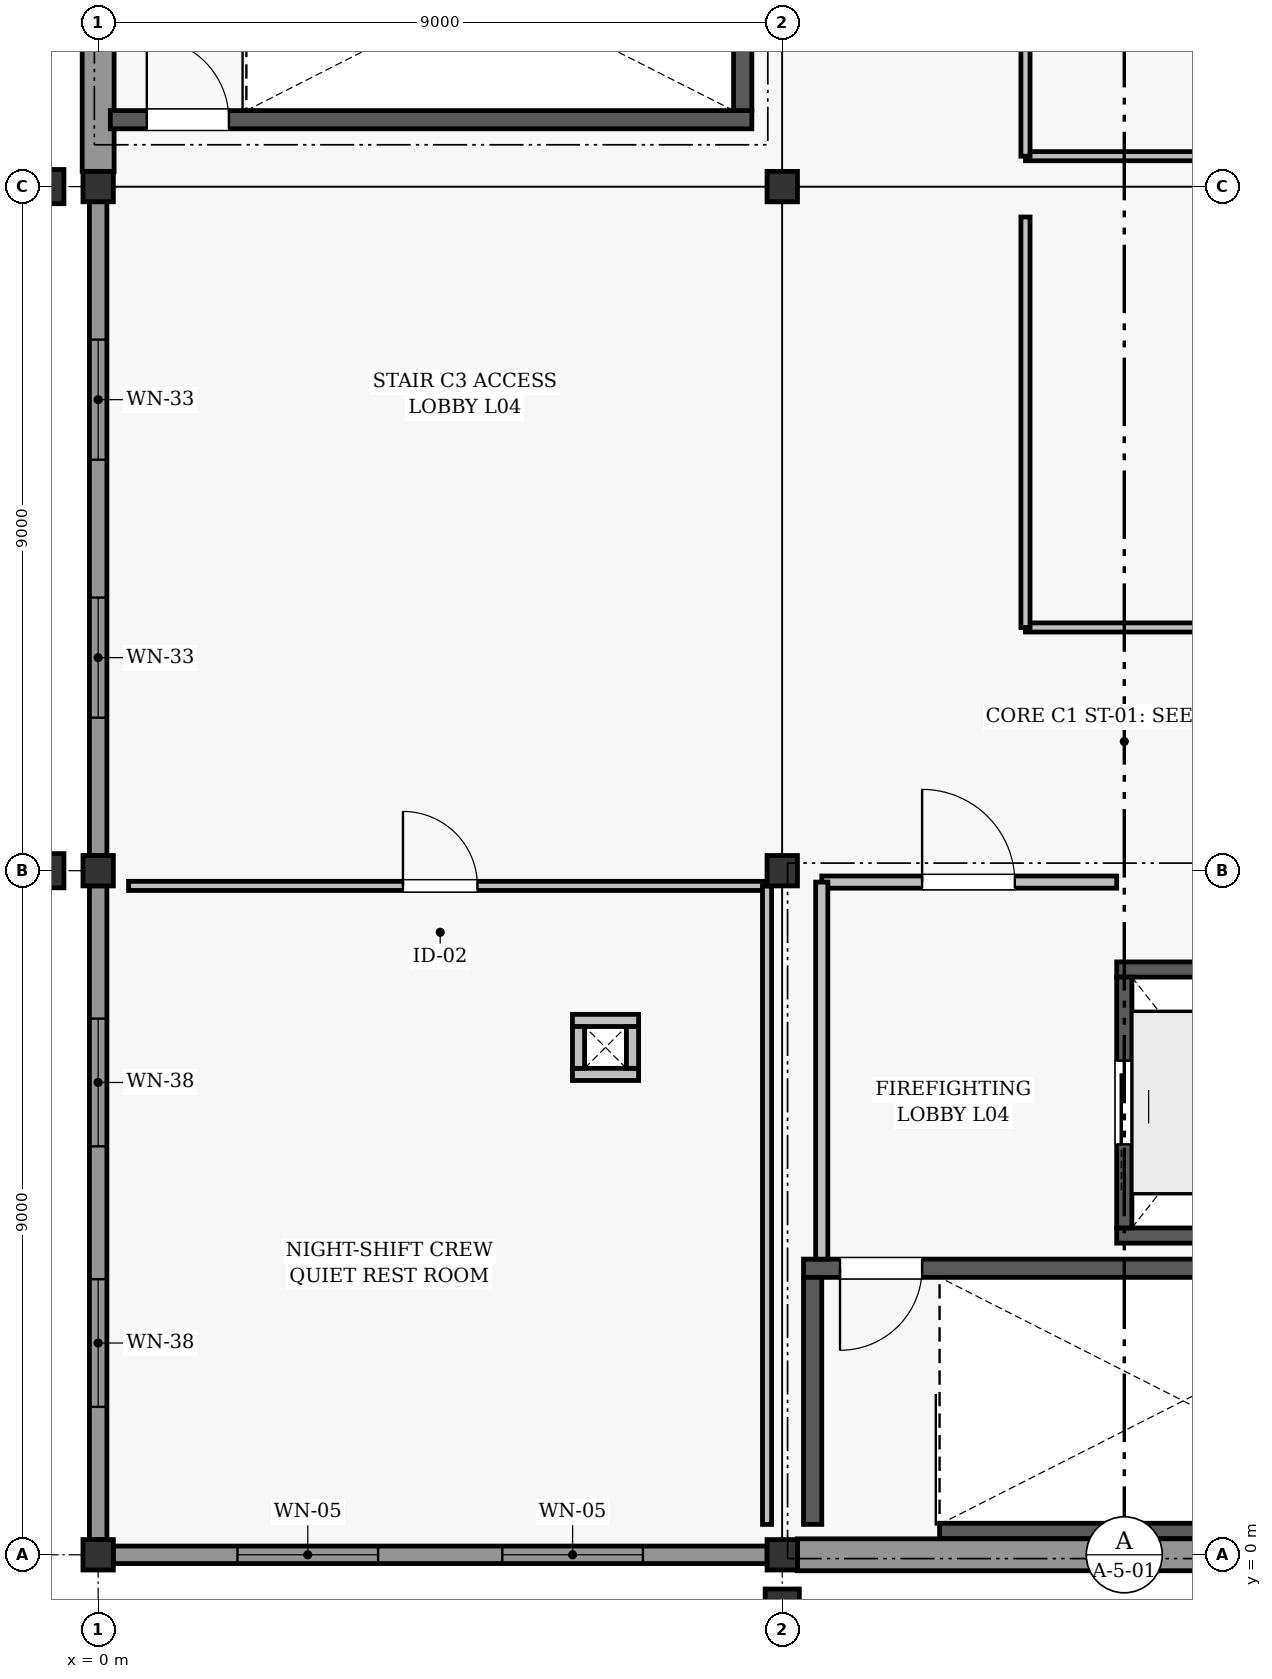
"""IFC4 building model, lengths in metres.
Left out: names, types, materials, properties, quantities, classifications, styles, units other than length and angle.
Written with IfcOpenShell. Run it as: python <this file> out.ifc"""

import sys

from ifc_helpers import new_model, si_unit, direction, frame, frame_2d, origin, origin_2d, place, context, subcontext, project, spatial, rectangle, extrude, element, fill, save


model = new_model("IFC4")
c1 = context("Model", 3, precision=1e-05, world=origin(), true_north=direction((0.0, 1.0)))
c2 = subcontext(c1, "Body", "Model", "MODEL_VIEW")
j1 = project(units=[si_unit("LENGTHUNIT", "METRE"), si_unit("PLANEANGLEUNIT", "RADIAN")], contexts=[c1])
p1 = place(None, origin())
s1 = spatial("IfcSite", under=j1, at=p1, CompositionType="ELEMENT")
p2 = place(p1, origin())
s2 = spatial("IfcBuilding", under=s1, at=p2, CompositionType="ELEMENT")
p3 = place(p2, frame((0.0, 0.0, 15.0)))
s3 = spatial("IfcBuildingStorey", under=s2, at=p3, CompositionType="ELEMENT", Elevation=15.0)
for number, where, z_axis, x_axis in (
    (1, (0.0, 0.0, 0.0), (0.0, 0.0, 1.0), (1.0, 0.0, 0.0)),
    (2, (0.0, 9.0, 0.0), (0.0, 0.0, 1.0), (1.0, 0.0, 0.0)),
    (3, (0.0, 18.0, 0.0), (0.0, 0.0, 1.0), (1.0, 0.0, 0.0)),
    (4, (9.0, 0.0, 0.0), (0.0, 0.0, 1.0), (1.0, 0.0, 0.0)),
    (5, (9.0, 9.0, 0.0), (0.0, 0.0, 1.0), (1.0, 0.0, 0.0)),
    (6, (9.0, 18.0, 0.0), (0.0, 0.0, 1.0), (1.0, 0.0, 0.0)),
):
    element("IfcColumn", number, at=place(p3, frame(where, z_axis=z_axis, x_axis=x_axis)), inside=s3, PredefinedType="COLUMN", context=c2, shape_type="SweptSolid", body=[
        extrude(rectangle(XDim=0.4, YDim=0.4, at=origin_2d()), origin(), (0.0, 0.0, 1.0), 3.0),
    ])
for number, where, z_axis, x_axis in (
    (7, (9.0, -0.75, 0.0), (0.0, 0.0, 1.0), (1.0, 0.0, 0.0)),
    (8, (-0.75, 9.0, 0.0), (0.0, 0.0, 1.0), (0.0, 1.0, 0.0)),
    (9, (-0.75, 18.0, 0.0), (0.0, 0.0, 1.0), (0.0, 1.0, 0.0)),
):
    element("IfcColumn", number, at=place(p3, frame(where, z_axis=z_axis, x_axis=x_axis)), inside=s3, PredefinedType="PILASTER", context=c2, shape_type="SweptSolid", body=[
        extrude(rectangle(XDim=0.45, YDim=0.6, at=origin_2d()), origin(), (0.0, 0.0, 1.0), 3.95),
    ])
p4 = place(p3, frame((0.198, 0.0, 0.0), z_axis=(0.0, 0.0, 1.0), x_axis=(1.0, 0.0, 0.0)))
e10 = element("IfcWall", 10, at=p4, inside=s3, PredefinedType="SOLIDWALL", context=c2, shape_type="SweptSolid", body=[
    extrude(rectangle(XDim=8.604, YDim=0.23, at=frame_2d((4.302, 0.0))), origin(), (0.0, 0.0, 1.0), 2.242),
])
p5 = place(p4, frame((1.635, 0.0, 1.02)))
e11 = element("IfcOpeningElement", 11, at=p5, cuts=e10, PredefinedType="OPENING", context=c2, shape_type="SweptSolid", body=[
    extrude(rectangle(XDim=1.85, YDim=1.04, at=frame_2d((0.925, 0.52))), frame((0.0, 0.125, 0.0), z_axis=(0.0, -1.0, 0.0), x_axis=(1.0, 0.0, 0.0)), (0.0, 0.0, 1.0), 0.25),
])
p6 = place(p4, frame((5.119, 0.0, 1.02)))
e12 = element("IfcOpeningElement", 12, at=p6, cuts=e10, PredefinedType="OPENING", context=c2, shape_type="SweptSolid", body=[
    extrude(rectangle(XDim=1.85, YDim=1.04, at=frame_2d((0.925, 0.52))), frame((0.0, 0.125, 0.0), z_axis=(0.0, -1.0, 0.0), x_axis=(1.0, 0.0, 0.0)), (0.0, 0.0, 1.0), 0.25),
])
p7 = place(p3, frame((9.198, 0.0, 0.0), z_axis=(0.0, 0.0, 1.0), x_axis=(1.0, 0.0, 0.0)))
e13 = element("IfcWall", 13, at=p7, inside=s3, PredefinedType="SOLIDWALL", context=c2, shape_type="SweptSolid", body=[
    extrude(rectangle(XDim=8.604, YDim=0.42, at=frame_2d((4.302, 0.0))), origin(), (0.0, 0.0, 1.0), 2.242),
])
p8 = place(p3, frame((0.0, 0.198, 0.0), z_axis=(0.0, 0.0, 1.0), x_axis=(0.0, 1.0, 0.0)))
e14 = element("IfcWall", 14, at=p8, inside=s3, PredefinedType="SOLIDWALL", context=c2, shape_type="SweptSolid", body=[
    extrude(rectangle(XDim=8.604, YDim=0.23, at=frame_2d((4.302, 0.0))), origin(), (0.0, 0.0, 1.0), 2.242),
])
p9 = place(p8, frame((1.748, 0.0, 0.45)))
e15 = element("IfcOpeningElement", 15, at=p9, cuts=e14, PredefinedType="OPENING", context=c2, shape_type="SweptSolid", body=[
    extrude(rectangle(XDim=1.68, YDim=1.66, at=frame_2d((0.84, 0.83))), frame((0.0, 0.125, 0.0), z_axis=(0.0, -1.0, 0.0), x_axis=(1.0, 0.0, 0.0)), (0.0, 0.0, 1.0), 0.25),
])
p10 = place(p8, frame((5.176, 0.0, 0.45)))
e16 = element("IfcOpeningElement", 16, at=p10, cuts=e14, PredefinedType="OPENING", context=c2, shape_type="SweptSolid", body=[
    extrude(rectangle(XDim=1.68, YDim=1.66, at=frame_2d((0.84, 0.83))), frame((0.0, 0.125, 0.0), z_axis=(0.0, -1.0, 0.0), x_axis=(1.0, 0.0, 0.0)), (0.0, 0.0, 1.0), 0.25),
])
p11 = place(p3, frame((0.0, 9.198, 0.0), z_axis=(0.0, 0.0, 1.0), x_axis=(0.0, 1.0, 0.0)))
e17 = element("IfcWall", 17, at=p11, inside=s3, PredefinedType="SOLIDWALL", context=c2, shape_type="SweptSolid", body=[
    extrude(rectangle(XDim=8.604, YDim=0.23, at=frame_2d((4.302, 0.0))), origin(), (0.0, 0.0, 1.0), 2.242),
])
p12 = place(p11, frame((1.815, 0.0, 0.46)))
e18 = element("IfcOpeningElement", 18, at=p12, cuts=e17, PredefinedType="OPENING", context=c2, shape_type="SweptSolid", body=[
    extrude(rectangle(XDim=1.58, YDim=1.6, at=frame_2d((0.79, 0.8))), frame((0.0, 0.125, 0.0), z_axis=(0.0, -1.0, 0.0), x_axis=(1.0, 0.0, 0.0)), (0.0, 0.0, 1.0), 0.25),
])
p13 = place(p11, frame((5.209, 0.0, 0.46)))
e19 = element("IfcOpeningElement", 19, at=p13, cuts=e17, PredefinedType="OPENING", context=c2, shape_type="SweptSolid", body=[
    extrude(rectangle(XDim=1.58, YDim=1.6, at=frame_2d((0.79, 0.8))), frame((0.0, 0.125, 0.0), z_axis=(0.0, -1.0, 0.0), x_axis=(1.0, 0.0, 0.0)), (0.0, 0.0, 1.0), 0.25),
])
p14 = place(p3, frame((0.0, 18.198, 0.0), z_axis=(0.0, 0.0, 1.0), x_axis=(0.0, 1.0, 0.0)))
e20 = element("IfcWall", 20, at=p14, inside=s3, PredefinedType="SOLIDWALL", context=c2, shape_type="SweptSolid", body=[
    extrude(rectangle(XDim=8.604, YDim=0.42, at=frame_2d((4.302, 0.0))), origin(), (0.0, 0.0, 1.0), 2.242),
])
p15 = place(p3, frame((11.07, 0.315, 0.0), z_axis=(0.0, 0.0, 1.0), x_axis=(1.0, 0.0, 0.0)))
e21 = element("IfcWall", 21, at=p15, inside=s3, PredefinedType="SHEAR", context=c2, shape_type="SweptSolid", body=[
    extrude(rectangle(XDim=6.41, YDim=0.2, at=frame_2d((3.205, 0.0))), origin(), (0.0, 0.0, 1.0), 2.79),
])
p16 = place(p3, frame((9.28, 3.77, 0.0), z_axis=(0.0, 0.0, 1.0), x_axis=(1.0, 0.0, 0.0)))
e22 = element("IfcWall", 22, at=p16, inside=s3, PredefinedType="SHEAR", context=c2, shape_type="SweptSolid", body=[
    extrude(rectangle(XDim=8.44, YDim=0.24, at=frame_2d((4.22, 0.0))), origin(), (0.0, 0.0, 1.0), 2.79),
])
p17 = place(p16, frame((0.48, 0.0, 0.0)))
e23 = element("IfcOpeningElement", 23, at=p17, cuts=e22, PredefinedType="OPENING", context=c2, shape_type="SweptSolid", body=[
    extrude(rectangle(XDim=1.08, YDim=2.08, at=frame_2d((0.54, 1.04))), frame((0.0, 0.13, 0.0), z_axis=(0.0, -1.0, 0.0), x_axis=(1.0, 0.0, 0.0)), (0.0, 0.0, 1.0), 0.26),
])
p18 = place(p3, frame((9.4, 0.4, 0.0), z_axis=(0.0, 0.0, 1.0), x_axis=(0.0, 1.0, 0.0)))
e24 = element("IfcWall", 24, at=p18, inside=s3, PredefinedType="SHEAR", context=c2, shape_type="SweptSolid", body=[
    extrude(rectangle(XDim=3.25, YDim=0.24, at=frame_2d((1.625, 0.0))), origin(), (0.0, 0.0, 1.0), 2.79),
])
p19 = place(p3, frame((0.16, 18.88, 0.0), z_axis=(0.0, 0.0, 1.0), x_axis=(1.0, 0.0, 0.0)))
e25 = element("IfcWall", 25, at=p19, inside=s3, PredefinedType="SHEAR", context=c2, shape_type="SweptSolid", body=[
    extrude(rectangle(XDim=8.44, YDim=0.24, at=frame_2d((4.22, 0.0))), origin(), (0.0, 0.0, 1.0), 2.79),
])
p20 = place(p19, frame((0.48, 0.0, 0.0)))
e26 = element("IfcOpeningElement", 26, at=p20, cuts=e25, PredefinedType="OPENING", context=c2, shape_type="SweptSolid", body=[
    extrude(rectangle(XDim=1.08, YDim=2.08, at=frame_2d((0.54, 1.04))), frame((0.0, 0.13, 0.0), z_axis=(0.0, -1.0, 0.0), x_axis=(1.0, 0.0, 0.0)), (0.0, 0.0, 1.0), 0.26),
])
p21 = place(p3, frame((8.48, 19.0, 0.0), z_axis=(0.0, 0.0, 1.0), x_axis=(0.0, 1.0, 0.0)))
e27 = element("IfcWall", 27, at=p21, inside=s3, PredefinedType="SHEAR", context=c2, shape_type="SweptSolid", body=[
    extrude(rectangle(XDim=3.25, YDim=0.24, at=frame_2d((1.625, 0.0))), origin(), (0.0, 0.0, 1.0), 2.79),
])
for number, where, z_axis, x_axis in (
    (28, (13.4, 4.2, 0.0), (0.0, 0.0, 1.0), (1.0, 0.0, 0.0)),
    (29, (13.4, 7.7, 0.0), (0.0, 0.0, 1.0), (1.0, 0.0, 0.0)),
):
    element("IfcWall", number, at=place(p3, frame(where, z_axis=z_axis, x_axis=x_axis)), inside=s3, PredefinedType="SHEAR", context=c2, shape_type="SweptSolid", body=[
        extrude(rectangle(XDim=3.0, YDim=0.2, at=frame_2d((1.5, 0.0))), origin(), (0.0, 0.0, 1.0), 2.79),
    ])
p22 = place(p3, frame((13.5, 4.3, 0.0), z_axis=(0.0, 0.0, 1.0), x_axis=(0.0, 1.0, 0.0)))
e30 = element("IfcWall", 30, at=p22, inside=s3, PredefinedType="SHEAR", context=c2, shape_type="SweptSolid", body=[
    extrude(rectangle(XDim=3.3, YDim=0.2, at=frame_2d((1.65, 0.0))), origin(), (0.0, 0.0, 1.0), 2.79),
])
p23 = place(p22, frame((1.1, 0.0, 0.0)))
e31 = element("IfcOpeningElement", 31, at=p23, cuts=e30, PredefinedType="OPENING", context=c2, shape_type="SweptSolid", body=[
    extrude(rectangle(XDim=1.1, YDim=2.1, at=frame_2d((0.55, 1.05))), frame((0.0, 0.11, 0.0), z_axis=(0.0, -1.0, 0.0), x_axis=(1.0, 0.0, 0.0)), (0.0, 0.0, 1.0), 0.22),
])
for number, where, z_axis, x_axis in (
    (32, (6.24, 6.32, 0.0), (0.0, 0.0, 1.0), (1.0, 0.0, 0.0)),
    (33, (6.24, 7.03, 0.0), (0.0, 0.0, 1.0), (1.0, 0.0, 0.0)),
):
    element("IfcWall", number, at=place(p3, frame(where, z_axis=z_axis, x_axis=x_axis)), inside=s3, PredefinedType="PARTITIONING", context=c2, shape_type="SweptSolid", body=[
        extrude(rectangle(XDim=0.87, YDim=0.16, at=frame_2d((0.435, 0.0))), origin(), (0.0, 0.0, 1.0), 2.79),
    ])
for number, where, z_axis, x_axis in (
    (34, (6.32, 6.4, 0.0), (0.0, 0.0, 1.0), (0.0, 1.0, 0.0)),
    (35, (7.03, 6.4, 0.0), (0.0, 0.0, 1.0), (0.0, 1.0, 0.0)),
):
    element("IfcWall", number, at=place(p3, frame(where, z_axis=z_axis, x_axis=x_axis)), inside=s3, PredefinedType="PARTITIONING", context=c2, shape_type="SweptSolid", body=[
        extrude(rectangle(XDim=0.55, YDim=0.16, at=frame_2d((0.275, 0.0))), origin(), (0.0, 0.0, 1.0), 2.79),
    ])
p24 = place(p3, frame((9.52, 8.85, 0.0), z_axis=(0.0, 0.0, 1.0), x_axis=(1.0, 0.0, 0.0)))
e36 = element("IfcWall", 36, at=p24, inside=s3, PredefinedType="PARTITIONING", context=c2, shape_type="SweptSolid", body=[
    extrude(rectangle(XDim=3.88, YDim=0.16, at=frame_2d((1.94, 0.0))), origin(), (0.0, 0.0, 1.0), 2.79),
])
p25 = place(p24, frame((1.32, 0.0, 0.0)))
e37 = element("IfcOpeningElement", 37, at=p25, cuts=e36, PredefinedType="OPENING", context=c2, shape_type="SweptSolid", body=[
    extrude(rectangle(XDim=1.22, YDim=2.12, at=frame_2d((0.61, 1.06))), frame((0.0, 0.09, 0.0), z_axis=(0.0, -1.0, 0.0), x_axis=(1.0, 0.0, 0.0)), (0.0, 0.0, 1.0), 0.18),
])
p26 = place(p3, frame((9.52, 3.89, 0.0), z_axis=(0.0, 0.0, 1.0), x_axis=(0.0, 1.0, 0.0)))
e38 = element("IfcWall", 38, at=p26, inside=s3, PredefinedType="PARTITIONING", context=c2, shape_type="SweptSolid", body=[
    extrude(rectangle(XDim=4.96, YDim=0.16, at=frame_2d((2.48, 0.0))), origin(), (0.0, 0.0, 1.0), 2.79),
])
p27 = place(p3, frame((0.4, 8.8, 0.0), z_axis=(0.0, 0.0, 1.0), x_axis=(1.0, 0.0, 0.0)))
e39 = element("IfcWall", 39, at=p27, inside=s3, PredefinedType="PARTITIONING", context=c2, shape_type="SweptSolid", body=[
    extrude(rectangle(XDim=8.4, YDim=0.12, at=frame_2d((4.2, 0.0))), origin(), (0.0, 0.0, 1.0), 2.245),
])
p28 = place(p27, frame((3.61, 0.0, 0.0)))
e40 = element("IfcOpeningElement", 40, at=p28, cuts=e39, PredefinedType="OPENING", context=c2, shape_type="SweptSolid", body=[
    extrude(rectangle(XDim=0.98, YDim=2.08, at=frame_2d((0.49, 1.04))), frame((0.0, 0.07, 0.0), z_axis=(0.0, -1.0, 0.0), x_axis=(1.0, 0.0, 0.0)), (0.0, 0.0, 1.0), 0.14),
])
p29 = place(p3, frame((8.8, 0.4, 0.0), z_axis=(0.0, 0.0, 1.0), x_axis=(0.0, 1.0, 0.0)))
e41 = element("IfcWall", 41, at=p29, inside=s3, PredefinedType="PARTITIONING", context=c2, shape_type="SweptSolid", body=[
    extrude(rectangle(XDim=8.4, YDim=0.12, at=frame_2d((4.2, 0.0))), origin(), (0.0, 0.0, 1.0), 2.245),
])
p30 = place(p3, frame((12.2, 12.2, 0.0), z_axis=(0.0, 0.0, 1.0), x_axis=(1.0, 0.0, 0.0)))
e42 = element("IfcWall", 42, at=p30, inside=s3, PredefinedType="PARTITIONING", context=c2, shape_type="SweptSolid", body=[
    extrude(rectangle(XDim=23.4, YDim=0.12, at=frame_2d((11.7, 0.0))), origin(), (0.0, 0.0, 1.0), 2.245),
])
p31 = place(p30, frame((9.49, 0.0, 0.0)))
e43 = element("IfcOpeningElement", 43, at=p31, cuts=e42, PredefinedType="OPENING", context=c2, shape_type="SweptSolid", body=[
    extrude(rectangle(XDim=1.62, YDim=2.14, at=frame_2d((0.81, 1.07))), frame((0.0, 0.07, 0.0), z_axis=(0.0, -1.0, 0.0), x_axis=(1.0, 0.0, 0.0)), (0.0, 0.0, 1.0), 0.14),
])
for number, where, z_axis, x_axis in (
    (44, (12.2, 12.2, 0.0), (0.0, 0.0, 1.0), (0.0, 1.0, 0.0)),
    (45, (12.2, 18.4, 0.0), (0.0, 0.0, 1.0), (1.0, 0.0, 0.0)),
):
    element("IfcWall", number, at=place(p3, frame(where, z_axis=z_axis, x_axis=x_axis)), inside=s3, PredefinedType="PARTITIONING", context=c2, shape_type="SweptSolid", body=[
        extrude(rectangle(XDim=5.4, YDim=0.12, at=frame_2d((2.7, 0.0))), origin(), (0.0, 0.0, 1.0), 2.79),
    ])
p32 = place(p3, frame((12.2, 18.4, 0.0), z_axis=(0.0, 0.0, 1.0), x_axis=(0.0, 1.0, 0.0)))
e46 = element("IfcWall", 46, at=p32, inside=s3, PredefinedType="PARTITIONING", context=c2, shape_type="SweptSolid", body=[
    extrude(rectangle(XDim=8.2, YDim=0.12, at=frame_2d((4.1, 0.0))), origin(), (0.0, 0.0, 1.0), 2.79),
])
p33 = place(p32, frame((3.63, 0.0, 0.0)))
e47 = element("IfcOpeningElement", 47, at=p33, cuts=e46, PredefinedType="OPENING", context=c2, shape_type="SweptSolid", body=[
    extrude(rectangle(XDim=0.94, YDim=2.06, at=frame_2d((0.47, 1.03))), frame((0.0, 0.07, 0.0), z_axis=(0.0, -1.0, 0.0), x_axis=(1.0, 0.0, 0.0)), (0.0, 0.0, 1.0), 0.14),
])
p34 = place(p5, origin())
e48 = element("IfcWindow", 48, at=p34, inside=s3, PartitioningType="SINGLE_PANEL", PredefinedType="WINDOW", context=c2, shape_type="SweptSolid", body=[
    extrude(rectangle(XDim=1.85, YDim=1.04, at=frame_2d((0.925, 0.52))), frame((0.0, 0.03, 0.0), z_axis=(0.0, -1.0, 0.0), x_axis=(1.0, 0.0, 0.0)), (0.0, 0.0, 1.0), 0.06),
])
fill(e11, e48)
p35 = place(p6, origin())
e49 = element("IfcWindow", 49, at=p35, inside=s3, PartitioningType="SINGLE_PANEL", PredefinedType="WINDOW", context=c2, shape_type="SweptSolid", body=[
    extrude(rectangle(XDim=1.85, YDim=1.04, at=frame_2d((0.925, 0.52))), frame((0.0, 0.03, 0.0), z_axis=(0.0, -1.0, 0.0), x_axis=(1.0, 0.0, 0.0)), (0.0, 0.0, 1.0), 0.06),
])
fill(e12, e49)
p36 = place(p9, origin())
e50 = element("IfcWindow", 50, at=p36, inside=s3, PartitioningType="SINGLE_PANEL", PredefinedType="WINDOW", context=c2, shape_type="SweptSolid", body=[
    extrude(rectangle(XDim=1.68, YDim=1.66, at=frame_2d((0.84, 0.83))), frame((0.0, 0.03, 0.0), z_axis=(0.0, -1.0, 0.0), x_axis=(1.0, 0.0, 0.0)), (0.0, 0.0, 1.0), 0.06),
])
fill(e15, e50)
p37 = place(p10, origin())
e51 = element("IfcWindow", 51, at=p37, inside=s3, PartitioningType="SINGLE_PANEL", PredefinedType="WINDOW", context=c2, shape_type="SweptSolid", body=[
    extrude(rectangle(XDim=1.68, YDim=1.66, at=frame_2d((0.84, 0.83))), frame((0.0, 0.03, 0.0), z_axis=(0.0, -1.0, 0.0), x_axis=(1.0, 0.0, 0.0)), (0.0, 0.0, 1.0), 0.06),
])
fill(e16, e51)
p38 = place(p12, origin())
e52 = element("IfcWindow", 52, at=p38, inside=s3, PartitioningType="SINGLE_PANEL", PredefinedType="WINDOW", context=c2, shape_type="SweptSolid", body=[
    extrude(rectangle(XDim=1.58, YDim=1.6, at=frame_2d((0.79, 0.8))), frame((0.0, 0.03, 0.0), z_axis=(0.0, -1.0, 0.0), x_axis=(1.0, 0.0, 0.0)), (0.0, 0.0, 1.0), 0.06),
])
fill(e18, e52)
p39 = place(p13, origin())
e53 = element("IfcWindow", 53, at=p39, inside=s3, PartitioningType="SINGLE_PANEL", PredefinedType="WINDOW", context=c2, shape_type="SweptSolid", body=[
    extrude(rectangle(XDim=1.58, YDim=1.6, at=frame_2d((0.79, 0.8))), frame((0.0, 0.03, 0.0), z_axis=(0.0, -1.0, 0.0), x_axis=(1.0, 0.0, 0.0)), (0.0, 0.0, 1.0), 0.06),
])
fill(e19, e53)
p40 = place(p17, frame((1.08, 0.0, 0.0), z_axis=(0.0, 0.0, 1.0), x_axis=(-1.0, 0.0, 0.0)))
e54 = element("IfcDoor", 54, at=p40, inside=s3, OperationType="SINGLE_SWING_LEFT", PredefinedType="DOOR", context=c2, shape_type="SweptSolid", body=[
    extrude(rectangle(XDim=1.08, YDim=2.08, at=frame_2d((0.54, 1.04))), frame((0.0, 0.025, 0.0), z_axis=(0.0, -1.0, 0.0), x_axis=(1.0, 0.0, 0.0)), (0.0, 0.0, 1.0), 0.05),
])
fill(e23, e54)
p41 = place(p20, origin())
e55 = element("IfcDoor", 55, at=p41, inside=s3, OperationType="SINGLE_SWING_LEFT", PredefinedType="DOOR", context=c2, shape_type="SweptSolid", body=[
    extrude(rectangle(XDim=1.08, YDim=2.08, at=frame_2d((0.54, 1.04))), frame((0.0, 0.025, 0.0), z_axis=(0.0, -1.0, 0.0), x_axis=(1.0, 0.0, 0.0)), (0.0, 0.0, 1.0), 0.05),
])
fill(e26, e55)
p42 = place(p23, origin())
e56 = element("IfcDoor", 56, at=p42, inside=s3, OperationType="SLIDING_TO_LEFT", PredefinedType="DOOR", context=c2, shape_type="SweptSolid", body=[
    extrude(rectangle(XDim=1.1, YDim=2.1, at=frame_2d((0.55, 1.05))), frame((0.0, 0.025, 0.0), z_axis=(0.0, -1.0, 0.0), x_axis=(1.0, 0.0, 0.0)), (0.0, 0.0, 1.0), 0.05),
])
fill(e31, e56)
p43 = place(p25, origin())
e57 = element("IfcDoor", 57, at=p43, inside=s3, OperationType="SINGLE_SWING_LEFT", PredefinedType="DOOR", context=c2, shape_type="SweptSolid", body=[
    extrude(rectangle(XDim=1.22, YDim=2.12, at=frame_2d((0.61, 1.06))), frame((0.0, 0.025, 0.0), z_axis=(0.0, -1.0, 0.0), x_axis=(1.0, 0.0, 0.0)), (0.0, 0.0, 1.0), 0.05),
])
fill(e37, e57)
p44 = place(p28, origin())
e58 = element("IfcDoor", 58, at=p44, inside=s3, OperationType="SINGLE_SWING_LEFT", PredefinedType="DOOR", context=c2, shape_type="SweptSolid", body=[
    extrude(rectangle(XDim=0.98, YDim=2.08, at=frame_2d((0.49, 1.04))), frame((0.0, 0.025, 0.0), z_axis=(0.0, -1.0, 0.0), x_axis=(1.0, 0.0, 0.0)), (0.0, 0.0, 1.0), 0.05),
])
fill(e40, e58)
save(model, sys.argv[1])
